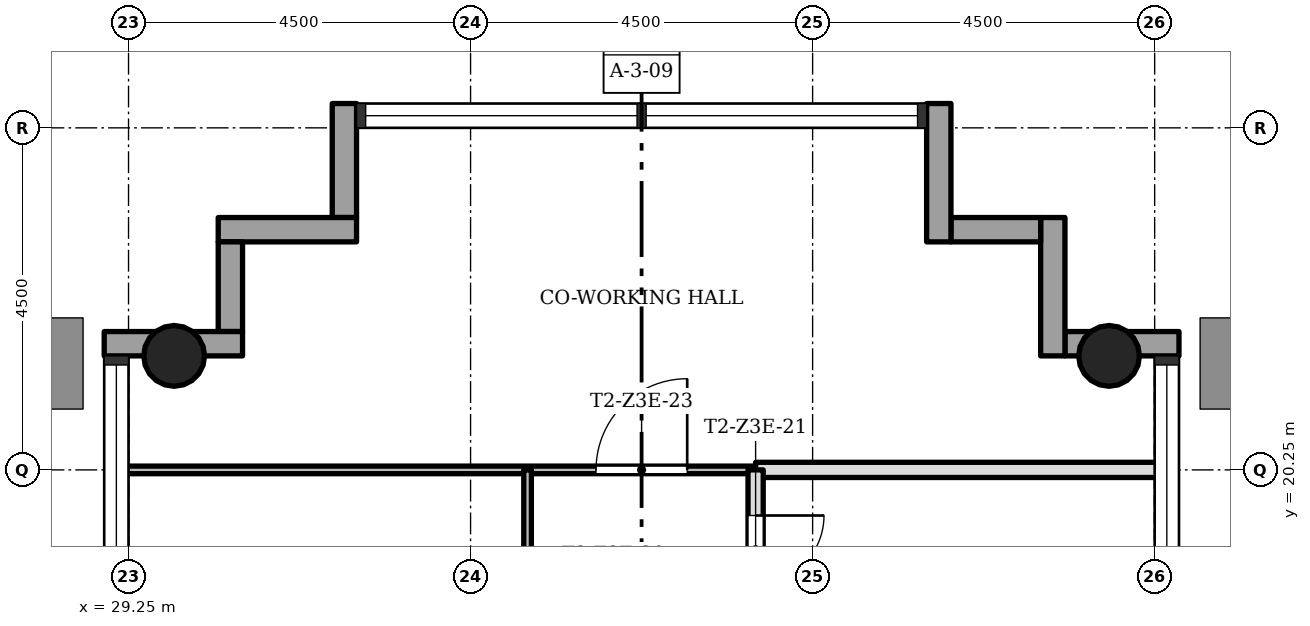
"""IFC4 building model, lengths in metres.
Left out: names, types, materials, properties, quantities, classifications, styles, units other than length and angle.
Written with IfcOpenShell. Run it as: python <this file> out.ifc"""

import sys

from ifc_helpers import new_model, si_unit, direction, frame, frame_2d, origin, origin_2d, place, context, subcontext, project, spatial, rectangle, hollow_circle, extrude, element, fill, save


model = new_model("IFC4")
c1 = context("Model", 3, precision=1e-05, world=origin(), true_north=direction((0.0, 1.0)))
c2 = subcontext(c1, "Body", "Model", "MODEL_VIEW")
j1 = project(units=[si_unit("LENGTHUNIT", "METRE"), si_unit("PLANEANGLEUNIT", "RADIAN")], contexts=[c1])
p1 = place(None, origin())
s1 = spatial("IfcSite", under=j1, at=p1, CompositionType="ELEMENT")
p2 = place(p1, origin())
s2 = spatial("IfcBuilding", under=s1, at=p2, CompositionType="ELEMENT")
p3 = place(p2, frame((0.0, 0.0, 177.9)))
s3 = spatial("IfcBuildingStorey", under=s2, at=p3, CompositionType="ELEMENT", Elevation=177.9)
for number, where, z_axis, x_axis in (
    (1, (42.15, 21.75, 0.0), (0.0, 0.0, 1.0), (1.0, 0.0, 0.0)),
    (2, (29.85, 21.75, 0.0), (0.0, 0.0, 1.0), (1.0, 0.0, 0.0)),
):
    element("IfcColumn", number, at=place(p3, frame(where, z_axis=z_axis, x_axis=x_axis)), inside=s3, PredefinedType="COLUMN", context=c2, shape_type="SweptSolid", body=[
        extrude(hollow_circle(Radius=0.4, WallThickness=0.028, at=origin_2d()), origin(), (0.0, 0.0, 1.0), 3.4),
    ])
p4 = place(p3, frame((43.07, 21.91, -0.3), z_axis=(0.0, 0.0, 1.0), x_axis=(-1.0, 0.0, 0.0)))
e3 = element("IfcWall", 3, at=p4, inside=s3, PredefinedType="STANDARD", context=c2, shape_type="SweptSolid", body=[
    extrude(rectangle(XDim=1.5, YDim=0.32, at=frame_2d((0.75, 0.0))), origin(), (0.0, 0.0, 1.0), 3.4),
])
p5 = place(p3, frame((41.41, 21.75, -0.3), z_axis=(0.0, 0.0, 1.0), x_axis=(0.0, 1.0, 0.0)))
e4 = element("IfcWall", 4, at=p5, inside=s3, PredefinedType="STANDARD", context=c2, shape_type="SweptSolid", body=[
    extrude(rectangle(XDim=1.82, YDim=0.32, at=frame_2d((0.91, 0.0))), origin(), (0.0, 0.0, 1.0), 3.4),
])
p6 = place(p3, frame((41.25, 23.41, -0.3), z_axis=(0.0, 0.0, 1.0), x_axis=(-1.0, 0.0, 0.0)))
e5 = element("IfcWall", 5, at=p6, inside=s3, PredefinedType="STANDARD", context=c2, shape_type="SweptSolid", body=[
    extrude(rectangle(XDim=1.18, YDim=0.32, at=frame_2d((0.59, 0.0))), origin(), (0.0, 0.0, 1.0), 3.4),
])
p7 = place(p3, frame((39.91, 23.25, -0.3), z_axis=(0.0, 0.0, 1.0), x_axis=(0.0, 1.0, 0.0)))
e6 = element("IfcWall", 6, at=p7, inside=s3, PredefinedType="STANDARD", context=c2, shape_type="SweptSolid", body=[
    extrude(rectangle(XDim=1.82, YDim=0.32, at=frame_2d((0.91, 0.0))), origin(), (0.0, 0.0, 1.0), 3.4),
])
p8 = place(p3, frame((32.09, 25.07, -0.3), z_axis=(0.0, 0.0, 1.0), x_axis=(0.0, -1.0, 0.0)))
e7 = element("IfcWall", 7, at=p8, inside=s3, PredefinedType="STANDARD", context=c2, shape_type="SweptSolid", body=[
    extrude(rectangle(XDim=1.5, YDim=0.32, at=frame_2d((0.75, 0.0))), origin(), (0.0, 0.0, 1.0), 3.4),
])
p9 = place(p3, frame((32.25, 23.41, -0.3), z_axis=(0.0, 0.0, 1.0), x_axis=(-1.0, 0.0, 0.0)))
e8 = element("IfcWall", 8, at=p9, inside=s3, PredefinedType="STANDARD", context=c2, shape_type="SweptSolid", body=[
    extrude(rectangle(XDim=1.82, YDim=0.32, at=frame_2d((0.91, 0.0))), origin(), (0.0, 0.0, 1.0), 3.4),
])
p10 = place(p3, frame((30.59, 23.25, -0.3), z_axis=(0.0, 0.0, 1.0), x_axis=(0.0, -1.0, 0.0)))
e9 = element("IfcWall", 9, at=p10, inside=s3, PredefinedType="STANDARD", context=c2, shape_type="SweptSolid", body=[
    extrude(rectangle(XDim=1.18, YDim=0.32, at=frame_2d((0.59, 0.0))), origin(), (0.0, 0.0, 1.0), 3.4),
])
p11 = place(p3, frame((30.75, 21.91, -0.3), z_axis=(0.0, 0.0, 1.0), x_axis=(-1.0, 0.0, 0.0)))
e10 = element("IfcWall", 10, at=p11, inside=s3, PredefinedType="STANDARD", context=c2, shape_type="SweptSolid", body=[
    extrude(rectangle(XDim=1.82, YDim=0.32, at=frame_2d((0.91, 0.0))), origin(), (0.0, 0.0, 1.0), 3.4),
])
p12 = place(p3, frame((37.5, 20.25, 0.0), z_axis=(0.0, 0.0, 1.0), x_axis=(-1.0, 0.0, 0.0)))
e11 = element("IfcWall", 11, at=p12, inside=s3, PredefinedType="PARTITIONING", context=c2, shape_type="SweptSolid", body=[
    extrude(rectangle(XDim=8.35, YDim=0.1, at=frame_2d((4.175, 0.0))), origin(), (0.0, 0.0, 1.0), 3.0),
])
p13 = place(p12, frame((0.9, 0.0, 0.0)))
e12 = element("IfcOpeningElement", 12, at=p13, cuts=e11, PredefinedType="OPENING", context=c2, shape_type="SweptSolid", body=[
    extrude(rectangle(XDim=1.2, YDim=2.1, at=frame_2d((0.6, 1.05))), frame((0.0, 0.06, 0.0), z_axis=(0.0, -1.0, 0.0), x_axis=(1.0, 0.0, 0.0)), (0.0, 0.0, 1.0), 0.12),
])
p14 = place(p3, frame((42.85, 20.25, 0.0), z_axis=(0.0, 0.0, 1.0), x_axis=(-1.0, 0.0, 0.0)))
e13 = element("IfcWall", 13, at=p14, inside=s3, PredefinedType="SOLIDWALL", context=c2, shape_type="SweptSolid", body=[
    extrude(rectangle(XDim=5.35, YDim=0.2, at=frame_2d((2.675, 0.0))), origin(), (0.0, 0.0, 1.0), 3.0),
])
p15 = place(p3, frame((37.5, 15.75, 0.0), z_axis=(0.0, 0.0, 1.0), x_axis=(0.0, 1.0, 0.0)))
e14 = element("IfcWall", 14, at=p15, inside=s3, PredefinedType="SOLIDWALL", context=c2, shape_type="SweptSolid", body=[
    extrude(rectangle(XDim=4.5, YDim=0.2, at=frame_2d((2.25, 0.0))), origin(), (0.0, 0.0, 1.0), 3.0),
])
p16 = place(p15, frame((3.0, 0.0, 0.0)))
e15 = element("IfcOpeningElement", 15, at=p16, cuts=e14, PredefinedType="OPENING", context=c2, shape_type="SweptSolid", body=[
    extrude(rectangle(XDim=0.9, YDim=2.1, at=frame_2d((0.45, 1.05))), frame((0.0, 0.11, 0.0), z_axis=(0.0, -1.0, 0.0), x_axis=(1.0, 0.0, 0.0)), (0.0, 0.0, 1.0), 0.22),
])
p17 = place(p3, frame((34.5, 15.75, 0.0), z_axis=(0.0, 0.0, 1.0), x_axis=(0.0, 1.0, 0.0)))
e16 = element("IfcWall", 16, at=p17, inside=s3, PredefinedType="PARTITIONING", context=c2, shape_type="SweptSolid", body=[
    extrude(rectangle(XDim=4.5, YDim=0.1, at=frame_2d((2.25, 0.0))), origin(), (0.0, 0.0, 1.0), 3.0),
])
p18 = place(p17, frame((1.8, 0.0, 0.0)))
e17 = element("IfcOpeningElement", 17, at=p18, cuts=e16, PredefinedType="OPENING", context=c2, shape_type="SweptSolid", body=[
    extrude(rectangle(XDim=0.9, YDim=2.1, at=frame_2d((0.45, 1.05))), frame((0.0, 0.06, 0.0), z_axis=(0.0, -1.0, 0.0), x_axis=(1.0, 0.0, 0.0)), (0.0, 0.0, 1.0), 0.12),
])
p19 = place(p16, origin())
e18 = element("IfcDoor", 18, at=p19, inside=s3, OperationType="SINGLE_SWING_RIGHT", PredefinedType="DOOR", context=c2, shape_type="SweptSolid", body=[
    extrude(rectangle(XDim=0.9, YDim=2.1, at=frame_2d((0.45, 1.05))), frame((0.0, 0.025, 0.0), z_axis=(0.0, -1.0, 0.0), x_axis=(1.0, 0.0, 0.0)), (0.0, 0.0, 1.0), 0.05),
])
fill(e15, e18)
p20 = place(p13, origin())
e19 = element("IfcDoor", 19, at=p20, inside=s3, OperationType="SINGLE_SWING_LEFT", PredefinedType="DOOR", context=c2, shape_type="SweptSolid", body=[
    extrude(rectangle(XDim=1.2, YDim=2.1, at=frame_2d((0.6, 1.05))), frame((0.0, 0.025, 0.0), z_axis=(0.0, -1.0, 0.0), x_axis=(1.0, 0.0, 0.0)), (0.0, 0.0, 1.0), 0.05),
])
fill(e12, e19)
save(model, sys.argv[1])
